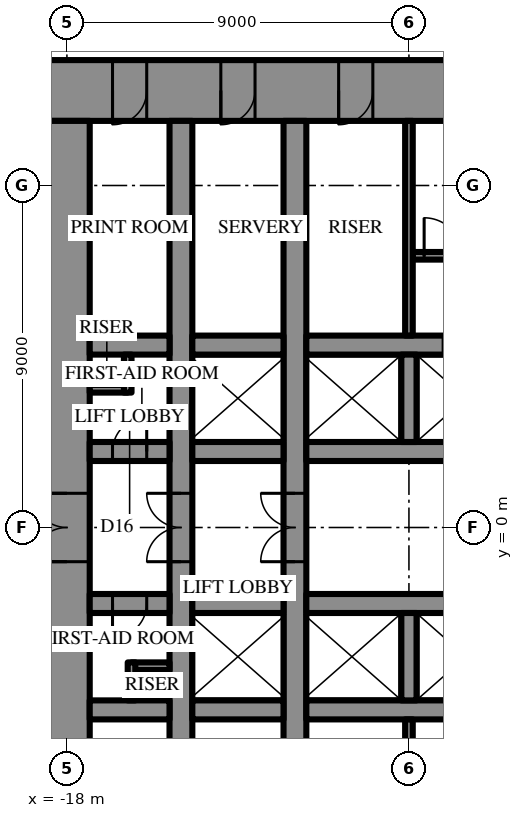
"""IFC4 building model, lengths in metres.
Left out: names, types, materials, properties, quantities, classifications, styles, units other than length and angle.
Written with IfcOpenShell. Run it as: python <this file> out.ifc"""

import sys

from ifc_helpers import new_model, si_unit, direction, frame, frame_2d, origin, place, context, subcontext, project, spatial, rectangle, extrude, element, fill, save


model = new_model("IFC4")
c1 = context("Model", 3, precision=1e-05, world=origin(), true_north=direction((0.0, 1.0)))
c2 = subcontext(c1, "Body", "Model", "MODEL_VIEW")
j1 = project(units=[si_unit("LENGTHUNIT", "METRE"), si_unit("PLANEANGLEUNIT", "RADIAN")], contexts=[c1])
p1 = place(None, origin())
s1 = spatial("IfcSite", under=j1, at=p1, CompositionType="ELEMENT")
p2 = place(p1, origin())
s2 = spatial("IfcBuilding", under=s1, at=p2, CompositionType="ELEMENT")
p3 = place(p2, frame((0.0, 0.0, 153.1)))
s3 = spatial("IfcBuildingStorey", under=s2, at=p3, CompositionType="ELEMENT", Elevation=153.1)
p4 = place(p3, frame((-18.6, 11.5, 0.0), z_axis=(0.0, 0.0, 1.0), x_axis=(1.0, 0.0, 0.0)))
e1 = element("IfcWall", 1, at=p4, inside=s3, PredefinedType="SHEAR", context=c2, shape_type="SweptSolid", body=[
    extrude(rectangle(XDim=37.2, YDim=1.6, at=frame_2d((18.6, 0.0))), origin(), (0.0, 0.0, 1.0), 4.2),
])
p5 = place(p4, frame((19.45, 0.0, 0.0)))
e2 = element("IfcOpeningElement", 2, at=p5, cuts=e1, PredefinedType="OPENING", context=c2, shape_type="SweptSolid", body=[
    extrude(rectangle(XDim=0.9, YDim=2.2, at=frame_2d((0.45, 1.1))), frame((0.0, 0.81, 0.0), z_axis=(0.0, -1.0, 0.0), x_axis=(1.0, 0.0, 0.0)), (0.0, 0.0, 1.0), 1.62),
])
p6 = place(p4, frame((22.45, 0.0, 0.0)))
e3 = element("IfcOpeningElement", 3, at=p6, cuts=e1, PredefinedType="OPENING", context=c2, shape_type="SweptSolid", body=[
    extrude(rectangle(XDim=0.9, YDim=2.2, at=frame_2d((0.45, 1.1))), frame((0.0, 0.81, 0.0), z_axis=(0.0, -1.0, 0.0), x_axis=(1.0, 0.0, 0.0)), (0.0, 0.0, 1.0), 1.62),
])
p7 = place(p4, frame((25.5, 0.0, 0.0)))
e4 = element("IfcOpeningElement", 4, at=p7, cuts=e1, PredefinedType="OPENING", context=c2, shape_type="SweptSolid", body=[
    extrude(rectangle(XDim=1.0, YDim=2.2, at=frame_2d((0.5, 1.1))), frame((0.0, 0.81, 0.0), z_axis=(0.0, -1.0, 0.0), x_axis=(1.0, 0.0, 0.0)), (0.0, 0.0, 1.0), 1.62),
])
p8 = place(p4, frame((1.8, 0.0, 0.0)))
e5 = element("IfcOpeningElement", 5, at=p8, cuts=e1, PredefinedType="OPENING", context=c2, shape_type="SweptSolid", body=[
    extrude(rectangle(XDim=0.9, YDim=2.2, at=frame_2d((0.45, 1.1))), frame((0.0, 0.81, 0.0), z_axis=(0.0, -1.0, 0.0), x_axis=(1.0, 0.0, 0.0)), (0.0, 0.0, 1.0), 1.62),
])
p9 = place(p4, frame((4.65, 0.0, 0.0)))
e6 = element("IfcOpeningElement", 6, at=p9, cuts=e1, PredefinedType="OPENING", context=c2, shape_type="SweptSolid", body=[
    extrude(rectangle(XDim=0.9, YDim=2.2, at=frame_2d((0.45, 1.1))), frame((0.0, 0.81, 0.0), z_axis=(0.0, -1.0, 0.0), x_axis=(1.0, 0.0, 0.0)), (0.0, 0.0, 1.0), 1.62),
])
p10 = place(p4, frame((7.75, 0.0, 0.0)))
e7 = element("IfcOpeningElement", 7, at=p10, cuts=e1, PredefinedType="OPENING", context=c2, shape_type="SweptSolid", body=[
    extrude(rectangle(XDim=0.9, YDim=2.2, at=frame_2d((0.45, 1.1))), frame((0.0, 0.81, 0.0), z_axis=(0.0, -1.0, 0.0), x_axis=(1.0, 0.0, 0.0)), (0.0, 0.0, 1.0), 1.62),
])
p11 = place(p4, frame((28.55, 0.0, 0.0)))
e8 = element("IfcOpeningElement", 8, at=p11, cuts=e1, PredefinedType="OPENING", context=c2, shape_type="SweptSolid", body=[
    extrude(rectangle(XDim=0.9, YDim=2.2, at=frame_2d((0.45, 1.1))), frame((0.0, 0.81, 0.0), z_axis=(0.0, -1.0, 0.0), x_axis=(1.0, 0.0, 0.0)), (0.0, 0.0, 1.0), 1.62),
])
p12 = place(p4, frame((31.65, 0.0, 0.0)))
e9 = element("IfcOpeningElement", 9, at=p12, cuts=e1, PredefinedType="OPENING", context=c2, shape_type="SweptSolid", body=[
    extrude(rectangle(XDim=0.9, YDim=2.2, at=frame_2d((0.45, 1.1))), frame((0.0, 0.81, 0.0), z_axis=(0.0, -1.0, 0.0), x_axis=(1.0, 0.0, 0.0)), (0.0, 0.0, 1.0), 1.62),
])
p13 = place(p4, frame((34.5, 0.0, 0.0)))
e10 = element("IfcOpeningElement", 10, at=p13, cuts=e1, PredefinedType="OPENING", context=c2, shape_type="SweptSolid", body=[
    extrude(rectangle(XDim=0.9, YDim=2.2, at=frame_2d((0.45, 1.1))), frame((0.0, 0.81, 0.0), z_axis=(0.0, -1.0, 0.0), x_axis=(1.0, 0.0, 0.0)), (0.0, 0.0, 1.0), 1.62),
])
p14 = place(p3, frame((-18.0, 10.7, 0.0), z_axis=(0.0, 0.0, 1.0), x_axis=(0.0, -1.0, 0.0)))
e11 = element("IfcWall", 11, at=p14, inside=s3, PredefinedType="SHEAR", context=c2, shape_type="SweptSolid", body=[
    extrude(rectangle(XDim=21.4, YDim=1.2, at=frame_2d((10.7, 0.0))), origin(), (0.0, 0.0, 1.0), 4.2),
])
p15 = place(p14, frame((9.8, 0.0, 0.0)))
e12 = element("IfcOpeningElement", 12, at=p15, cuts=e11, PredefinedType="OPENING", context=c2, shape_type="SweptSolid", body=[
    extrude(rectangle(XDim=1.8, YDim=2.4, at=frame_2d((0.9, 1.2))), frame((0.0, 0.61, 0.0), z_axis=(0.0, -1.0, 0.0), x_axis=(1.0, 0.0, 0.0)), (0.0, 0.0, 1.0), 1.22),
])
p16 = place(p3, frame((-12.0, -10.7, 0.0), z_axis=(0.0, 0.0, 1.0), x_axis=(0.0, 1.0, 0.0)))
e13 = element("IfcWall", 13, at=p16, inside=s3, PredefinedType="SHEAR", context=c2, shape_type="SweptSolid", body=[
    extrude(rectangle(XDim=21.4, YDim=0.6, at=frame_2d((10.7, 0.0))), origin(), (0.0, 0.0, 1.0), 4.2),
])
p17 = place(p16, frame((9.8, 0.0, 0.0)))
e14 = element("IfcOpeningElement", 14, at=p17, cuts=e13, PredefinedType="OPENING", context=c2, shape_type="SweptSolid", body=[
    extrude(rectangle(XDim=1.8, YDim=2.4, at=frame_2d((0.9, 1.2))), frame((0.0, 0.31, 0.0), z_axis=(0.0, -1.0, 0.0), x_axis=(1.0, 0.0, 0.0)), (0.0, 0.0, 1.0), 0.62),
])
p18 = place(p3, frame((-15.0, -10.7, 0.0), z_axis=(0.0, 0.0, 1.0), x_axis=(0.0, 1.0, 0.0)))
e15 = element("IfcWall", 15, at=p18, inside=s3, PredefinedType="SHEAR", context=c2, shape_type="SweptSolid", body=[
    extrude(rectangle(XDim=21.4, YDim=0.6, at=frame_2d((10.7, 0.0))), origin(), (0.0, 0.0, 1.0), 4.2),
])
p19 = place(p18, frame((9.8, 0.0, 0.0)))
e16 = element("IfcOpeningElement", 16, at=p19, cuts=e15, PredefinedType="OPENING", context=c2, shape_type="SweptSolid", body=[
    extrude(rectangle(XDim=1.8, YDim=2.4, at=frame_2d((0.9, 1.2))), frame((0.0, 0.31, 0.0), z_axis=(0.0, -1.0, 0.0), x_axis=(1.0, 0.0, 0.0)), (0.0, 0.0, 1.0), 0.62),
])
p20 = place(p3, frame((-17.4, 2.0, 0.0), z_axis=(0.0, 0.0, 1.0), x_axis=(1.0, 0.0, 0.0)))
e17 = element("IfcWall", 17, at=p20, inside=s3, PredefinedType="SHEAR", context=c2, shape_type="SweptSolid", body=[
    extrude(rectangle(XDim=2.1, YDim=0.5, at=frame_2d((1.05, 0.0))), origin(), (0.0, 0.0, 1.0), 4.2),
])
p21 = place(p20, frame((0.6, 0.0, 0.0)))
e18 = element("IfcOpeningElement", 18, at=p21, cuts=e17, PredefinedType="OPENING", context=c2, shape_type="SweptSolid", body=[
    extrude(rectangle(XDim=0.9, YDim=2.2, at=frame_2d((0.45, 1.1))), frame((0.0, 0.26, 0.0), z_axis=(0.0, -1.0, 0.0), x_axis=(1.0, 0.0, 0.0)), (0.0, 0.0, 1.0), 0.52),
])
p22 = place(p3, frame((-14.7, 2.0, 0.0), z_axis=(0.0, 0.0, 1.0), x_axis=(1.0, 0.0, 0.0)))
e19 = element("IfcWall", 19, at=p22, inside=s3, PredefinedType="SHEAR", context=c2, shape_type="SweptSolid", body=[
    extrude(rectangle(XDim=2.4, YDim=0.5, at=frame_2d((1.2, 0.0))), origin(), (0.0, 0.0, 1.0), 4.2),
])
p23 = place(p3, frame((-11.7, 2.0, 0.0), z_axis=(0.0, 0.0, 1.0), x_axis=(1.0, 0.0, 0.0)))
e20 = element("IfcWall", 20, at=p23, inside=s3, PredefinedType="SHEAR", context=c2, shape_type="SweptSolid", body=[
    extrude(rectangle(XDim=5.9, YDim=0.5, at=frame_2d((2.95, 0.0))), origin(), (0.0, 0.0, 1.0), 4.2),
])
p24 = place(p3, frame((-17.4, 4.8, 0.0), z_axis=(0.0, 0.0, 1.0), x_axis=(1.0, 0.0, 0.0)))
e21 = element("IfcWall", 21, at=p24, inside=s3, PredefinedType="SHEAR", context=c2, shape_type="SweptSolid", body=[
    extrude(rectangle(XDim=2.1, YDim=0.5, at=frame_2d((1.05, 0.0))), origin(), (0.0, 0.0, 1.0), 4.2),
])
p25 = place(p3, frame((-14.7, 4.8, 0.0), z_axis=(0.0, 0.0, 1.0), x_axis=(1.0, 0.0, 0.0)))
e22 = element("IfcWall", 22, at=p25, inside=s3, PredefinedType="SHEAR", context=c2, shape_type="SweptSolid", body=[
    extrude(rectangle(XDim=2.4, YDim=0.5, at=frame_2d((1.2, 0.0))), origin(), (0.0, 0.0, 1.0), 4.2),
])
p26 = place(p3, frame((-11.7, 4.8, 0.0), z_axis=(0.0, 0.0, 1.0), x_axis=(1.0, 0.0, 0.0)))
e23 = element("IfcWall", 23, at=p26, inside=s3, PredefinedType="SHEAR", context=c2, shape_type="SweptSolid", body=[
    extrude(rectangle(XDim=23.4, YDim=0.5, at=frame_2d((11.7, 0.0))), origin(), (0.0, 0.0, 1.0), 4.2),
])
p27 = place(p26, frame((6.6, 0.0, 0.0)))
e24 = element("IfcOpeningElement", 24, at=p27, cuts=e23, PredefinedType="OPENING", context=c2, shape_type="SweptSolid", body=[
    extrude(rectangle(XDim=1.2, YDim=2.2, at=frame_2d((0.6, 1.1))), frame((0.0, 0.26, 0.0), z_axis=(0.0, -1.0, 0.0), x_axis=(1.0, 0.0, 0.0)), (0.0, 0.0, 1.0), 0.52),
])
p28 = place(p26, frame((3.6, 0.0, 0.0)))
e25 = element("IfcOpeningElement", 25, at=p28, cuts=e23, PredefinedType="OPENING", context=c2, shape_type="SweptSolid", body=[
    extrude(rectangle(XDim=1.2, YDim=2.2, at=frame_2d((0.6, 1.1))), frame((0.0, 0.26, 0.0), z_axis=(0.0, -1.0, 0.0), x_axis=(1.0, 0.0, 0.0)), (0.0, 0.0, 1.0), 0.52),
])
p29 = place(p3, frame((-9.0, 2.25, 0.0), z_axis=(0.0, 0.0, 1.0), x_axis=(0.0, 1.0, 0.0)))
e26 = element("IfcWall", 26, at=p29, inside=s3, PredefinedType="SHEAR", context=c2, shape_type="SweptSolid", body=[
    extrude(rectangle(XDim=2.3, YDim=0.4, at=frame_2d((1.15, 0.0))), origin(), (0.0, 0.0, 1.0), 4.2),
])
p30 = place(p3, frame((-8.9, 7.15, 0.0), z_axis=(0.0, 0.0, 1.0), x_axis=(1.0, 0.0, 0.0)))
e27 = element("IfcWall", 27, at=p30, inside=s3, PredefinedType="SHEAR", context=c2, shape_type="SweptSolid", body=[
    extrude(rectangle(XDim=8.6, YDim=0.2, at=frame_2d((4.3, 0.0))), origin(), (0.0, 0.0, 1.0), 4.2),
])
p31 = place(p30, frame((0.3, 0.0, 0.0)))
e28 = element("IfcOpeningElement", 28, at=p31, cuts=e27, PredefinedType="OPENING", context=c2, shape_type="SweptSolid", body=[
    extrude(rectangle(XDim=1.0, YDim=2.2, at=frame_2d((0.5, 1.1))), frame((0.0, 0.11, 0.0), z_axis=(0.0, -1.0, 0.0), x_axis=(1.0, 0.0, 0.0)), (0.0, 0.0, 1.0), 0.22),
])
p32 = place(p3, frame((3.2, -2.0, 0.0), z_axis=(0.0, 0.0, 1.0), x_axis=(-1.0, 0.0, 0.0)))
e29 = element("IfcWall", 29, at=p32, inside=s3, PredefinedType="SHEAR", context=c2, shape_type="SweptSolid", body=[
    extrude(rectangle(XDim=14.9, YDim=0.5, at=frame_2d((7.45, 0.0))), origin(), (0.0, 0.0, 1.0), 4.2),
])
p33 = place(p32, frame((1.15, 0.0, 0.0)))
e30 = element("IfcOpeningElement", 30, at=p33, cuts=e29, PredefinedType="OPENING", context=c2, shape_type="SweptSolid", body=[
    extrude(rectangle(XDim=1.1, YDim=2.2, at=frame_2d((0.55, 1.1))), frame((0.0, 0.26, 0.0), z_axis=(0.0, -1.0, 0.0), x_axis=(1.0, 0.0, 0.0)), (0.0, 0.0, 1.0), 0.52),
])
p34 = place(p32, frame((4.15, 0.0, 0.0)))
e31 = element("IfcOpeningElement", 31, at=p34, cuts=e29, PredefinedType="OPENING", context=c2, shape_type="SweptSolid", body=[
    extrude(rectangle(XDim=1.1, YDim=2.2, at=frame_2d((0.55, 1.1))), frame((0.0, 0.26, 0.0), z_axis=(0.0, -1.0, 0.0), x_axis=(1.0, 0.0, 0.0)), (0.0, 0.0, 1.0), 0.52),
])
p35 = place(p32, frame((7.15, 0.0, 0.0)))
e32 = element("IfcOpeningElement", 32, at=p35, cuts=e29, PredefinedType="OPENING", context=c2, shape_type="SweptSolid", body=[
    extrude(rectangle(XDim=1.1, YDim=2.2, at=frame_2d((0.55, 1.1))), frame((0.0, 0.26, 0.0), z_axis=(0.0, -1.0, 0.0), x_axis=(1.0, 0.0, 0.0)), (0.0, 0.0, 1.0), 0.52),
])
p36 = place(p32, frame((10.15, 0.0, 0.0)))
e33 = element("IfcOpeningElement", 33, at=p36, cuts=e29, PredefinedType="OPENING", context=c2, shape_type="SweptSolid", body=[
    extrude(rectangle(XDim=1.1, YDim=2.2, at=frame_2d((0.55, 1.1))), frame((0.0, 0.26, 0.0), z_axis=(0.0, -1.0, 0.0), x_axis=(1.0, 0.0, 0.0)), (0.0, 0.0, 1.0), 0.52),
])
p37 = place(p3, frame((-12.3, -2.0, 0.0), z_axis=(0.0, 0.0, 1.0), x_axis=(-1.0, 0.0, 0.0)))
e34 = element("IfcWall", 34, at=p37, inside=s3, PredefinedType="SHEAR", context=c2, shape_type="SweptSolid", body=[
    extrude(rectangle(XDim=2.4, YDim=0.5, at=frame_2d((1.2, 0.0))), origin(), (0.0, 0.0, 1.0), 4.2),
])
p38 = place(p3, frame((-15.3, -2.0, 0.0), z_axis=(0.0, 0.0, 1.0), x_axis=(-1.0, 0.0, 0.0)))
e35 = element("IfcWall", 35, at=p38, inside=s3, PredefinedType="SHEAR", context=c2, shape_type="SweptSolid", body=[
    extrude(rectangle(XDim=2.1, YDim=0.5, at=frame_2d((1.05, 0.0))), origin(), (0.0, 0.0, 1.0), 4.2),
])
p39 = place(p38, frame((0.6, 0.0, 0.0)))
e36 = element("IfcOpeningElement", 36, at=p39, cuts=e35, PredefinedType="OPENING", context=c2, shape_type="SweptSolid", body=[
    extrude(rectangle(XDim=0.9, YDim=2.2, at=frame_2d((0.45, 1.1))), frame((0.0, 0.26, 0.0), z_axis=(0.0, -1.0, 0.0), x_axis=(1.0, 0.0, 0.0)), (0.0, 0.0, 1.0), 0.52),
])
p40 = place(p3, frame((11.7, -4.8, 0.0), z_axis=(0.0, 0.0, 1.0), x_axis=(-1.0, 0.0, 0.0)))
e37 = element("IfcWall", 37, at=p40, inside=s3, PredefinedType="SHEAR", context=c2, shape_type="SweptSolid", body=[
    extrude(rectangle(XDim=23.4, YDim=0.5, at=frame_2d((11.7, 0.0))), origin(), (0.0, 0.0, 1.0), 4.2),
])
p41 = place(p40, frame((6.6, 0.0, 0.0)))
e38 = element("IfcOpeningElement", 38, at=p41, cuts=e37, PredefinedType="OPENING", context=c2, shape_type="SweptSolid", body=[
    extrude(rectangle(XDim=1.2, YDim=2.2, at=frame_2d((0.6, 1.1))), frame((0.0, 0.26, 0.0), z_axis=(0.0, -1.0, 0.0), x_axis=(1.0, 0.0, 0.0)), (0.0, 0.0, 1.0), 0.52),
])
p42 = place(p40, frame((3.6, 0.0, 0.0)))
e39 = element("IfcOpeningElement", 39, at=p42, cuts=e37, PredefinedType="OPENING", context=c2, shape_type="SweptSolid", body=[
    extrude(rectangle(XDim=1.2, YDim=2.2, at=frame_2d((0.6, 1.1))), frame((0.0, 0.26, 0.0), z_axis=(0.0, -1.0, 0.0), x_axis=(1.0, 0.0, 0.0)), (0.0, 0.0, 1.0), 0.52),
])
p43 = place(p3, frame((-12.3, -4.8, 0.0), z_axis=(0.0, 0.0, 1.0), x_axis=(-1.0, 0.0, 0.0)))
e40 = element("IfcWall", 40, at=p43, inside=s3, PredefinedType="SHEAR", context=c2, shape_type="SweptSolid", body=[
    extrude(rectangle(XDim=2.4, YDim=0.5, at=frame_2d((1.2, 0.0))), origin(), (0.0, 0.0, 1.0), 4.2),
])
p44 = place(p3, frame((-15.3, -4.8, 0.0), z_axis=(0.0, 0.0, 1.0), x_axis=(-1.0, 0.0, 0.0)))
e41 = element("IfcWall", 41, at=p44, inside=s3, PredefinedType="SHEAR", context=c2, shape_type="SweptSolid", body=[
    extrude(rectangle(XDim=2.1, YDim=0.5, at=frame_2d((1.05, 0.0))), origin(), (0.0, 0.0, 1.0), 4.2),
])
p45 = place(p3, frame((-9.0, -2.25, 0.0), z_axis=(0.0, 0.0, 1.0), x_axis=(0.0, -1.0, 0.0)))
e42 = element("IfcWall", 42, at=p45, inside=s3, PredefinedType="SHEAR", context=c2, shape_type="SweptSolid", body=[
    extrude(rectangle(XDim=2.3, YDim=0.4, at=frame_2d((1.15, 0.0))), origin(), (0.0, 0.0, 1.0), 4.2),
])
for number, where, z_axis, x_axis in (
    (43, (-9.0, 5.05, 0.0), (0.0, 0.0, 1.0), (0.0, 1.0, 0.0)),
    (44, (-9.0, -5.05, 0.0), (0.0, 0.0, 1.0), (0.0, -1.0, 0.0)),
):
    element("IfcWall", number, at=place(p3, frame(where, z_axis=z_axis, x_axis=x_axis)), inside=s3, PredefinedType="PARTITIONING", context=c2, shape_type="SweptSolid", body=[
        extrude(rectangle(XDim=5.65, YDim=0.2, at=frame_2d((2.825, 0.0))), origin(), (0.0, 0.0, 1.0), 4.0),
    ])
for number, where, z_axis, x_axis in (
    (45, (-17.4, 3.65, 0.0), (0.0, 0.0, 1.0), (1.0, 0.0, 0.0)),
    (46, (-16.4, 3.55, 0.0), (0.0, 0.0, 1.0), (0.0, 1.0, 0.0)),
    (47, (-15.3, -3.65, 0.0), (0.0, 0.0, 1.0), (-1.0, 0.0, 0.0)),
    (48, (-16.3, -3.55, 0.0), (0.0, 0.0, 1.0), (0.0, -1.0, 0.0)),
):
    element("IfcWall", number, at=place(p3, frame(where, z_axis=z_axis, x_axis=x_axis)), inside=s3, PredefinedType="PARTITIONING", context=c2, shape_type="SweptSolid", body=[
        extrude(rectangle(XDim=1.0, YDim=0.2, at=frame_2d((0.5, 0.0))), origin(), (0.0, 0.0, 1.0), 4.0),
    ])
p46 = place(p15, frame((1.8, 0.0, 0.0), z_axis=(0.0, 0.0, 1.0), x_axis=(-1.0, 0.0, 0.0)))
e49 = element("IfcDoor", 49, at=p46, inside=s3, OperationType="DOUBLE_DOOR_SINGLE_SWING", PredefinedType="DOOR", context=c2, shape_type="SweptSolid", body=[
    extrude(rectangle(XDim=1.8, YDim=2.4, at=frame_2d((0.9, 1.2))), frame((0.0, 0.025, 0.0), z_axis=(0.0, -1.0, 0.0), x_axis=(1.0, 0.0, 0.0)), (0.0, 0.0, 1.0), 0.05),
])
fill(e12, e49)
p47 = place(p31, origin())
e50 = element("IfcDoor", 50, at=p47, inside=s3, OperationType="SINGLE_SWING_RIGHT", PredefinedType="DOOR", context=c2, shape_type="SweptSolid", body=[
    extrude(rectangle(XDim=1.0, YDim=2.2, at=frame_2d((0.5, 1.1))), frame((0.0, 0.025, 0.0), z_axis=(0.0, -1.0, 0.0), x_axis=(1.0, 0.0, 0.0)), (0.0, 0.0, 1.0), 0.05),
])
fill(e28, e50)
p48 = place(p8, frame((0.9, 0.0, 0.0), z_axis=(0.0, 0.0, 1.0), x_axis=(-1.0, 0.0, 0.0)))
e51 = element("IfcDoor", 51, at=p48, inside=s3, OperationType="SINGLE_SWING_LEFT", PredefinedType="DOOR", context=c2, shape_type="SweptSolid", body=[
    extrude(rectangle(XDim=0.9, YDim=2.2, at=frame_2d((0.45, 1.1))), frame((0.0, 0.025, 0.0), z_axis=(0.0, -1.0, 0.0), x_axis=(1.0, 0.0, 0.0)), (0.0, 0.0, 1.0), 0.05),
])
fill(e5, e51)
p49 = place(p9, frame((0.9, 0.0, 0.0), z_axis=(0.0, 0.0, 1.0), x_axis=(-1.0, 0.0, 0.0)))
e52 = element("IfcDoor", 52, at=p49, inside=s3, OperationType="SINGLE_SWING_LEFT", PredefinedType="DOOR", context=c2, shape_type="SweptSolid", body=[
    extrude(rectangle(XDim=0.9, YDim=2.2, at=frame_2d((0.45, 1.1))), frame((0.0, 0.025, 0.0), z_axis=(0.0, -1.0, 0.0), x_axis=(1.0, 0.0, 0.0)), (0.0, 0.0, 1.0), 0.05),
])
fill(e6, e52)
p50 = place(p10, frame((0.9, 0.0, 0.0), z_axis=(0.0, 0.0, 1.0), x_axis=(-1.0, 0.0, 0.0)))
e53 = element("IfcDoor", 53, at=p50, inside=s3, OperationType="SINGLE_SWING_LEFT", PredefinedType="DOOR", context=c2, shape_type="SweptSolid", body=[
    extrude(rectangle(XDim=0.9, YDim=2.2, at=frame_2d((0.45, 1.1))), frame((0.0, 0.025, 0.0), z_axis=(0.0, -1.0, 0.0), x_axis=(1.0, 0.0, 0.0)), (0.0, 0.0, 1.0), 0.05),
])
fill(e7, e53)
p51 = place(p21, origin())
e54 = element("IfcDoor", 54, at=p51, inside=s3, OperationType="SINGLE_SWING_LEFT", PredefinedType="DOOR", context=c2, shape_type="SweptSolid", body=[
    extrude(rectangle(XDim=0.9, YDim=2.2, at=frame_2d((0.45, 1.1))), frame((0.0, 0.025, 0.0), z_axis=(0.0, -1.0, 0.0), x_axis=(1.0, 0.0, 0.0)), (0.0, 0.0, 1.0), 0.05),
])
fill(e18, e54)
p52 = place(p39, origin())
e55 = element("IfcDoor", 55, at=p52, inside=s3, OperationType="SINGLE_SWING_LEFT", PredefinedType="DOOR", context=c2, shape_type="SweptSolid", body=[
    extrude(rectangle(XDim=0.9, YDim=2.2, at=frame_2d((0.45, 1.1))), frame((0.0, 0.025, 0.0), z_axis=(0.0, -1.0, 0.0), x_axis=(1.0, 0.0, 0.0)), (0.0, 0.0, 1.0), 0.05),
])
fill(e36, e55)
p53 = place(p17, origin())
e56 = element("IfcDoor", 56, at=p53, inside=s3, OperationType="DOUBLE_DOOR_SINGLE_SWING", PredefinedType="DOOR", context=c2, shape_type="SweptSolid", body=[
    extrude(rectangle(XDim=1.8, YDim=2.4, at=frame_2d((0.9, 1.2))), frame((0.0, 0.025, 0.0), z_axis=(0.0, -1.0, 0.0), x_axis=(1.0, 0.0, 0.0)), (0.0, 0.0, 1.0), 0.05),
])
fill(e14, e56)
p54 = place(p19, origin())
e57 = element("IfcDoor", 57, at=p54, inside=s3, OperationType="DOUBLE_DOOR_SINGLE_SWING", PredefinedType="DOOR", context=c2, shape_type="SweptSolid", body=[
    extrude(rectangle(XDim=1.8, YDim=2.4, at=frame_2d((0.9, 1.2))), frame((0.0, 0.025, 0.0), z_axis=(0.0, -1.0, 0.0), x_axis=(1.0, 0.0, 0.0)), (0.0, 0.0, 1.0), 0.05),
])
fill(e16, e57)
save(model, sys.argv[1])
